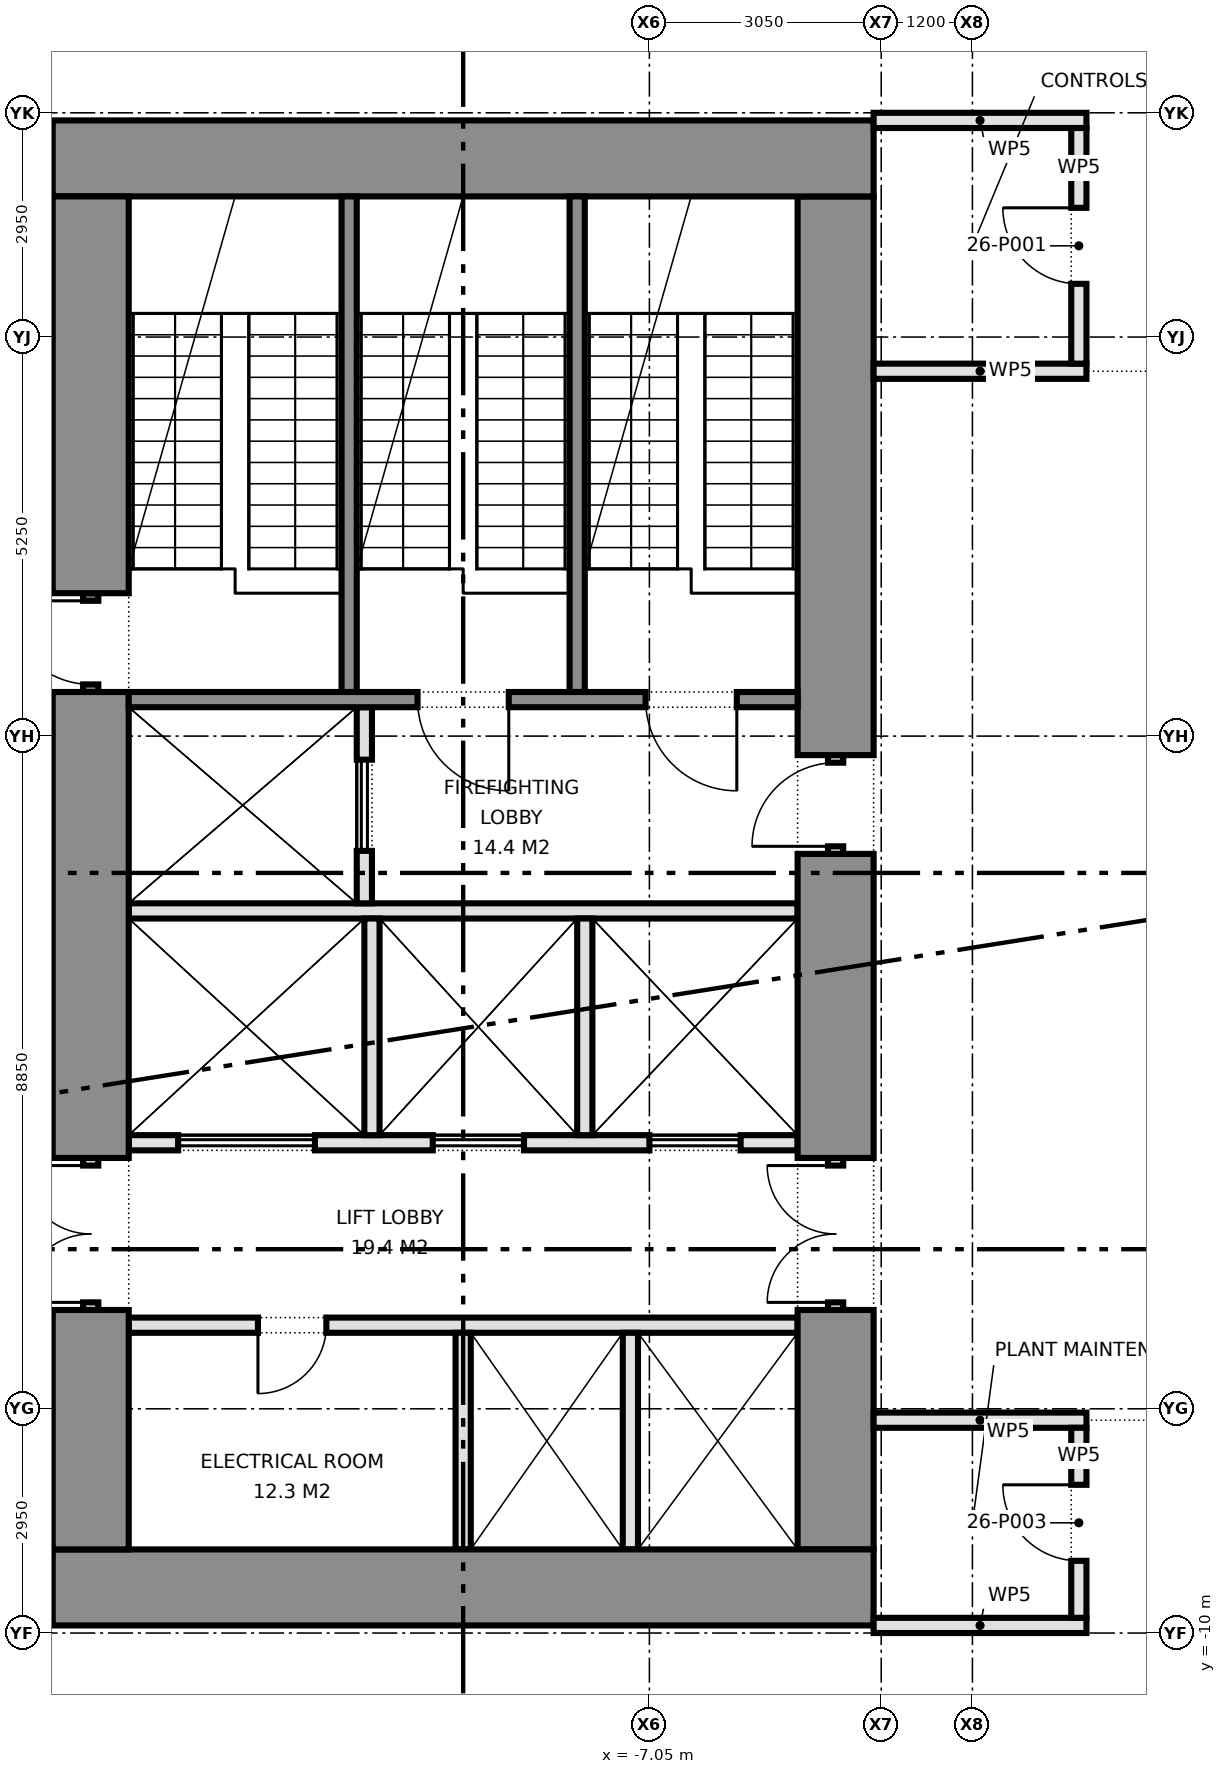
"""IFC4 building model, lengths in metres.
Left out: names, types, materials, properties, quantities, classifications, styles, units other than length and angle.
Written with IfcOpenShell. Run it as: python <this file> out.ifc"""

import sys

from ifc_helpers import new_model, si_unit, direction, frame, frame_2d, origin, place, context, subcontext, project, spatial, rectangle, extrude, element, fill, save


model = new_model("IFC4")
c1 = context("Model", 3, precision=1e-05, world=origin(), true_north=direction((0.0, 1.0)))
c2 = subcontext(c1, "Body", "Model", "MODEL_VIEW")
j1 = project(units=[si_unit("LENGTHUNIT", "METRE"), si_unit("PLANEANGLEUNIT", "RADIAN")], contexts=[c1])
p1 = place(None, origin())
s1 = spatial("IfcSite", under=j1, at=p1, CompositionType="ELEMENT")
p2 = place(p1, origin())
s2 = spatial("IfcBuilding", under=s1, at=p2, CompositionType="ELEMENT")
p3 = place(p2, frame((0.0, 0.0, 120.4)))
s3 = spatial("IfcBuildingStorey", under=s2, at=p3, CompositionType="ELEMENT", Elevation=120.4)
for number, where, z_axis, x_axis in (
    (1, (-14.9, -9.4, 0.0), (0.0, 0.0, 1.0), (1.0, 0.0, 0.0)),
    (2, (-14.9, 9.4, 0.0), (0.0, 0.0, 1.0), (1.0, 0.0, 0.0)),
):
    element("IfcWall", number, at=place(p3, frame(where, z_axis=z_axis, x_axis=x_axis)), inside=s3, PredefinedType="SHEAR", context=c2, shape_type="SweptSolid", body=[
        extrude(rectangle(XDim=10.8, YDim=1.0, at=frame_2d((5.4, 0.0))), origin(), (0.0, 0.0, 1.0), 4.34),
    ])
p4 = place(p3, frame((-14.4, -8.9, 0.0), z_axis=(0.0, 0.0, 1.0), x_axis=(0.0, 1.0, 0.0)))
e3 = element("IfcWall", 3, at=p4, inside=s3, PredefinedType="SHEAR", context=c2, shape_type="SweptSolid", body=[
    extrude(rectangle(XDim=3.15, YDim=1.0, at=frame_2d((1.575, 0.0))), origin(), (0.0, 0.0, 1.0), 4.34),
])
p5 = place(p3, frame((-14.4, -5.75, 0.0), z_axis=(0.0, 0.0, 1.0), x_axis=(0.0, 1.0, 0.0)))
e4 = element("IfcWall", 4, at=p5, inside=s3, PredefinedType="PARTITIONING", context=c2, shape_type="SweptSolid", body=[
    extrude(rectangle(XDim=2.0, YDim=0.2, at=frame_2d((1.0, 0.0))), origin(), (0.0, 0.0, 1.0), 2.4),
])
p6 = place(p5, frame((0.1, 0.0, 0.0)))
e5 = element("IfcOpeningElement", 5, at=p6, cuts=e4, PredefinedType="OPENING", context=c2, shape_type="SweptSolid", body=[
    extrude(rectangle(XDim=1.8, YDim=2.1, at=frame_2d((0.9, 1.05))), frame((0.0, 0.11, 0.0), z_axis=(0.0, -1.0, 0.0), x_axis=(1.0, 0.0, 0.0)), (0.0, 0.0, 1.0), 0.22),
])
p7 = place(p3, frame((-14.4, -3.75, 0.0), z_axis=(0.0, 0.0, 1.0), x_axis=(0.0, 1.0, 0.0)))
e6 = element("IfcWall", 6, at=p7, inside=s3, PredefinedType="SHEAR", context=c2, shape_type="SweptSolid", body=[
    extrude(rectangle(XDim=6.13, YDim=1.0, at=frame_2d((3.065, 0.0))), origin(), (0.0, 0.0, 1.0), 4.34),
])
p8 = place(p3, frame((-14.4, 2.38, 0.0), z_axis=(0.0, 0.0, 1.0), x_axis=(0.0, 1.0, 0.0)))
e7 = element("IfcWall", 7, at=p8, inside=s3, PredefinedType="SHEAR", context=c2, shape_type="SweptSolid", body=[
    extrude(rectangle(XDim=1.3, YDim=0.2, at=frame_2d((0.65, 0.0))), origin(), (0.0, 0.0, 1.0), 2.4),
])
p9 = place(p8, frame((0.1, 0.0, 0.0)))
e8 = element("IfcOpeningElement", 8, at=p9, cuts=e7, PredefinedType="OPENING", context=c2, shape_type="SweptSolid", body=[
    extrude(rectangle(XDim=1.1, YDim=2.1, at=frame_2d((0.55, 1.05))), frame((0.0, 0.11, 0.0), z_axis=(0.0, -1.0, 0.0), x_axis=(1.0, 0.0, 0.0)), (0.0, 0.0, 1.0), 0.22),
])
p10 = place(p3, frame((-14.4, 3.68, 0.0), z_axis=(0.0, 0.0, 1.0), x_axis=(0.0, 1.0, 0.0)))
e9 = element("IfcWall", 9, at=p10, inside=s3, PredefinedType="SHEAR", context=c2, shape_type="SweptSolid", body=[
    extrude(rectangle(XDim=5.22, YDim=1.0, at=frame_2d((2.61, 0.0))), origin(), (0.0, 0.0, 1.0), 4.34),
])
p11 = place(p3, frame((-4.6, -8.9, 0.0), z_axis=(0.0, 0.0, 1.0), x_axis=(0.0, 1.0, 0.0)))
e10 = element("IfcWall", 10, at=p11, inside=s3, PredefinedType="SHEAR", context=c2, shape_type="SweptSolid", body=[
    extrude(rectangle(XDim=3.15, YDim=1.0, at=frame_2d((1.575, 0.0))), origin(), (0.0, 0.0, 1.0), 4.34),
])
p12 = place(p3, frame((-4.6, -5.75, 0.0), z_axis=(0.0, 0.0, 1.0), x_axis=(0.0, 1.0, 0.0)))
e11 = element("IfcWall", 11, at=p12, inside=s3, PredefinedType="PARTITIONING", context=c2, shape_type="SweptSolid", body=[
    extrude(rectangle(XDim=2.0, YDim=0.2, at=frame_2d((1.0, 0.0))), origin(), (0.0, 0.0, 1.0), 2.4),
])
p13 = place(p12, frame((0.1, 0.0, 0.0)))
e12 = element("IfcOpeningElement", 12, at=p13, cuts=e11, PredefinedType="OPENING", context=c2, shape_type="SweptSolid", body=[
    extrude(rectangle(XDim=1.8, YDim=2.1, at=frame_2d((0.9, 1.05))), frame((0.0, 0.11, 0.0), z_axis=(0.0, -1.0, 0.0), x_axis=(1.0, 0.0, 0.0)), (0.0, 0.0, 1.0), 0.22),
])
p14 = place(p3, frame((-4.6, -3.75, 0.0), z_axis=(0.0, 0.0, 1.0), x_axis=(0.0, 1.0, 0.0)))
e13 = element("IfcWall", 13, at=p14, inside=s3, PredefinedType="SHEAR", context=c2, shape_type="SweptSolid", body=[
    extrude(rectangle(XDim=4.0, YDim=1.0, at=frame_2d((2.0, 0.0))), origin(), (0.0, 0.0, 1.0), 4.34),
])
p15 = place(p3, frame((-4.6, 0.25, 0.0), z_axis=(0.0, 0.0, 1.0), x_axis=(0.0, 1.0, 0.0)))
e14 = element("IfcWall", 14, at=p15, inside=s3, PredefinedType="PARTITIONING", context=c2, shape_type="SweptSolid", body=[
    extrude(rectangle(XDim=1.3, YDim=0.2, at=frame_2d((0.65, 0.0))), origin(), (0.0, 0.0, 1.0), 2.4),
])
p16 = place(p15, frame((0.1, 0.0, 0.0)))
e15 = element("IfcOpeningElement", 15, at=p16, cuts=e14, PredefinedType="OPENING", context=c2, shape_type="SweptSolid", body=[
    extrude(rectangle(XDim=1.1, YDim=2.1, at=frame_2d((0.55, 1.05))), frame((0.0, 0.11, 0.0), z_axis=(0.0, -1.0, 0.0), x_axis=(1.0, 0.0, 0.0)), (0.0, 0.0, 1.0), 0.22),
])
p17 = place(p3, frame((-4.6, 1.55, 0.0), z_axis=(0.0, 0.0, 1.0), x_axis=(0.0, 1.0, 0.0)))
e16 = element("IfcWall", 16, at=p17, inside=s3, PredefinedType="SHEAR", context=c2, shape_type="SweptSolid", body=[
    extrude(rectangle(XDim=7.35, YDim=1.0, at=frame_2d((3.675, 0.0))), origin(), (0.0, 0.0, 1.0), 4.34),
])
p18 = place(p3, frame((-13.9, -5.95, 0.0), z_axis=(0.0, 0.0, 1.0), x_axis=(1.0, 0.0, 0.0)))
e17 = element("IfcWall", 17, at=p18, inside=s3, PredefinedType="PARTITIONING", context=c2, shape_type="SweptSolid", body=[
    extrude(rectangle(XDim=8.8, YDim=0.2, at=frame_2d((4.4, 0.0))), origin(), (0.0, 0.0, 1.0), 4.34),
])
p19 = place(p18, frame((1.7, 0.0, 0.0)))
e18 = element("IfcOpeningElement", 18, at=p19, cuts=e17, PredefinedType="OPENING", context=c2, shape_type="SweptSolid", body=[
    extrude(rectangle(XDim=0.9, YDim=2.1, at=frame_2d((0.45, 1.05))), frame((0.0, 0.11, 0.0), z_axis=(0.0, -1.0, 0.0), x_axis=(1.0, 0.0, 0.0)), (0.0, 0.0, 1.0), 0.22),
])
p20 = place(p3, frame((-13.9, -3.55, 0.0), z_axis=(0.0, 0.0, 1.0), x_axis=(1.0, 0.0, 0.0)))
e19 = element("IfcWall", 19, at=p20, inside=s3, PredefinedType="PARTITIONING", context=c2, shape_type="SweptSolid", body=[
    extrude(rectangle(XDim=8.8, YDim=0.2, at=frame_2d((4.4, 0.0))), origin(), (0.0, 0.0, 1.0), 4.34),
])
p21 = place(p20, frame((0.65, 0.0, 0.0)))
e20 = element("IfcOpeningElement", 20, at=p21, cuts=e19, PredefinedType="OPENING", context=c2, shape_type="SweptSolid", body=[
    extrude(rectangle(XDim=1.8, YDim=2.1, at=frame_2d((0.9, 1.05))), frame((0.0, 0.11, 0.0), z_axis=(0.0, -1.0, 0.0), x_axis=(1.0, 0.0, 0.0)), (0.0, 0.0, 1.0), 0.22),
])
p22 = place(p20, frame((4.0, 0.0, 0.0)))
e21 = element("IfcOpeningElement", 21, at=p22, cuts=e19, PredefinedType="OPENING", context=c2, shape_type="SweptSolid", body=[
    extrude(rectangle(XDim=1.2, YDim=2.1, at=frame_2d((0.6, 1.05))), frame((0.0, 0.11, 0.0), z_axis=(0.0, -1.0, 0.0), x_axis=(1.0, 0.0, 0.0)), (0.0, 0.0, 1.0), 0.22),
])
p23 = place(p20, frame((6.85, 0.0, 0.0)))
e22 = element("IfcOpeningElement", 22, at=p23, cuts=e19, PredefinedType="OPENING", context=c2, shape_type="SweptSolid", body=[
    extrude(rectangle(XDim=1.2, YDim=2.1, at=frame_2d((0.6, 1.05))), frame((0.0, 0.11, 0.0), z_axis=(0.0, -1.0, 0.0), x_axis=(1.0, 0.0, 0.0)), (0.0, 0.0, 1.0), 0.22),
])
p24 = place(p3, frame((-13.9, -0.5, 0.0), z_axis=(0.0, 0.0, 1.0), x_axis=(1.0, 0.0, 0.0)))
e23 = element("IfcWall", 23, at=p24, inside=s3, PredefinedType="PARTITIONING", context=c2, shape_type="SweptSolid", body=[
    extrude(rectangle(XDim=8.8, YDim=0.2, at=frame_2d((4.4, 0.0))), origin(), (0.0, 0.0, 1.0), 4.34),
])
p25 = place(p3, frame((-10.8, -0.4, 0.0), z_axis=(0.0, 0.0, 1.0), x_axis=(0.0, 1.0, 0.0)))
e24 = element("IfcWall", 24, at=p25, inside=s3, PredefinedType="PARTITIONING", context=c2, shape_type="SweptSolid", body=[
    extrude(rectangle(XDim=2.58, YDim=0.2, at=frame_2d((1.29, 0.0))), origin(), (0.0, 0.0, 1.0), 4.34),
])
p26 = place(p25, frame((0.69, 0.0, 0.0)))
e25 = element("IfcOpeningElement", 25, at=p26, cuts=e24, PredefinedType="OPENING", context=c2, shape_type="SweptSolid", body=[
    extrude(rectangle(XDim=1.2, YDim=2.1, at=frame_2d((0.6, 1.05))), frame((0.0, 0.11, 0.0), z_axis=(0.0, -1.0, 0.0), x_axis=(1.0, 0.0, 0.0)), (0.0, 0.0, 1.0), 0.22),
])
p27 = place(p3, frame((-13.9, 2.28, 0.0), z_axis=(0.0, 0.0, 1.0), x_axis=(1.0, 0.0, 0.0)))
e26 = element("IfcWall", 26, at=p27, inside=s3, PredefinedType="SHEAR", context=c2, shape_type="SweptSolid", body=[
    extrude(rectangle(XDim=8.8, YDim=0.2, at=frame_2d((4.4, 0.0))), origin(), (0.0, 0.0, 1.0), 4.34),
])
p28 = place(p27, frame((3.8, 0.0, 0.0)))
e27 = element("IfcOpeningElement", 27, at=p28, cuts=e26, PredefinedType="OPENING", context=c2, shape_type="SweptSolid", body=[
    extrude(rectangle(XDim=1.2, YDim=2.1, at=frame_2d((0.6, 1.05))), frame((0.0, 0.11, 0.0), z_axis=(0.0, -1.0, 0.0), x_axis=(1.0, 0.0, 0.0)), (0.0, 0.0, 1.0), 0.22),
])
p29 = place(p27, frame((6.8, 0.0, 0.0)))
e28 = element("IfcOpeningElement", 28, at=p29, cuts=e26, PredefinedType="OPENING", context=c2, shape_type="SweptSolid", body=[
    extrude(rectangle(XDim=1.2, YDim=2.1, at=frame_2d((0.6, 1.05))), frame((0.0, 0.11, 0.0), z_axis=(0.0, -1.0, 0.0), x_axis=(1.0, 0.0, 0.0)), (0.0, 0.0, 1.0), 0.22),
])
for number, where, z_axis, x_axis in (
    (29, (-11.0, 2.38, 0.0), (0.0, 0.0, 1.0), (0.0, 1.0, 0.0)),
    (30, (-8.0, 2.38, 0.0), (0.0, 0.0, 1.0), (0.0, 1.0, 0.0)),
):
    element("IfcWall", number, at=place(p3, frame(where, z_axis=z_axis, x_axis=x_axis)), inside=s3, PredefinedType="SHEAR", context=c2, shape_type="SweptSolid", body=[
        extrude(rectangle(XDim=6.52, YDim=0.2, at=frame_2d((3.26, 0.0))), origin(), (0.0, 0.0, 1.0), 4.34),
    ])
for number, where, z_axis, x_axis in (
    (31, (-9.5, -8.9, 0.0), (0.0, 0.0, 1.0), (0.0, 1.0, 0.0)),
    (32, (-7.3, -8.9, 0.0), (0.0, 0.0, 1.0), (0.0, 1.0, 0.0)),
    (33, (-10.7, -3.45, 0.0), (0.0, 0.0, 1.0), (0.0, 1.0, 0.0)),
    (34, (-7.9, -3.45, 0.0), (0.0, 0.0, 1.0), (0.0, 1.0, 0.0)),
):
    element("IfcWall", number, at=place(p3, frame(where, z_axis=z_axis, x_axis=x_axis)), inside=s3, PredefinedType="PARTITIONING", context=c2, shape_type="SweptSolid", body=[
        extrude(rectangle(XDim=2.85, YDim=0.2, at=frame_2d((1.425, 0.0))), origin(), (0.0, 0.0, 1.0), 4.34),
    ])
for number, where, z_axis, x_axis in (
    (35, (-4.1, -9.9, 0.0), (0.0, 0.0, 1.0), (1.0, 0.0, 0.0)),
    (36, (-4.1, -7.2, 0.0), (0.0, 0.0, 1.0), (1.0, 0.0, 0.0)),
    (37, (-4.1, 6.6, 0.0), (0.0, 0.0, 1.0), (1.0, 0.0, 0.0)),
    (38, (-4.1, 9.9, 0.0), (0.0, 0.0, 1.0), (1.0, 0.0, 0.0)),
):
    element("IfcWall", number, at=place(p3, frame(where, z_axis=z_axis, x_axis=x_axis)), inside=s3, PredefinedType="PARTITIONING", context=c2, shape_type="SweptSolid", body=[
        extrude(rectangle(XDim=2.8, YDim=0.2, at=frame_2d((1.4, 0.0))), origin(), (0.0, 0.0, 1.0), 4.34),
    ])
p30 = place(p3, frame((-1.4, -9.8, 0.0), z_axis=(0.0, 0.0, 1.0), x_axis=(0.0, 1.0, 0.0)))
e39 = element("IfcWall", 39, at=p30, inside=s3, PredefinedType="PARTITIONING", context=c2, shape_type="SweptSolid", body=[
    extrude(rectangle(XDim=2.5, YDim=0.2, at=frame_2d((1.25, 0.0))), origin(), (0.0, 0.0, 1.0), 4.34),
])
p31 = place(p30, frame((0.75, 0.0, 0.0)))
e40 = element("IfcOpeningElement", 40, at=p31, cuts=e39, PredefinedType="OPENING", context=c2, shape_type="SweptSolid", body=[
    extrude(rectangle(XDim=1.0, YDim=2.1, at=frame_2d((0.5, 1.05))), frame((0.0, 0.11, 0.0), z_axis=(0.0, -1.0, 0.0), x_axis=(1.0, 0.0, 0.0)), (0.0, 0.0, 1.0), 0.22),
])
p32 = place(p3, frame((-1.4, 6.7, 0.0), z_axis=(0.0, 0.0, 1.0), x_axis=(0.0, 1.0, 0.0)))
e41 = element("IfcWall", 41, at=p32, inside=s3, PredefinedType="PARTITIONING", context=c2, shape_type="SweptSolid", body=[
    extrude(rectangle(XDim=3.1, YDim=0.2, at=frame_2d((1.55, 0.0))), origin(), (0.0, 0.0, 1.0), 4.34),
])
p33 = place(p32, frame((1.05, 0.0, 0.0)))
e42 = element("IfcOpeningElement", 42, at=p33, cuts=e41, PredefinedType="OPENING", context=c2, shape_type="SweptSolid", body=[
    extrude(rectangle(XDim=1.0, YDim=2.1, at=frame_2d((0.5, 1.05))), frame((0.0, 0.11, 0.0), z_axis=(0.0, -1.0, 0.0), x_axis=(1.0, 0.0, 0.0)), (0.0, 0.0, 1.0), 0.22),
])
p34 = place(p6, origin())
e43 = element("IfcDoor", 43, at=p34, inside=s3, OperationType="DOUBLE_DOOR_SINGLE_SWING", PredefinedType="DOOR", context=c2, shape_type="SweptSolid", body=[
    extrude(rectangle(XDim=1.8, YDim=2.1, at=frame_2d((0.9, 1.05))), frame((0.0, 0.025, 0.0), z_axis=(0.0, -1.0, 0.0), x_axis=(1.0, 0.0, 0.0)), (0.0, 0.0, 1.0), 0.05),
])
fill(e5, e43)
p35 = place(p9, origin())
e44 = element("IfcDoor", 44, at=p35, inside=s3, OperationType="SINGLE_SWING_RIGHT", PredefinedType="DOOR", context=c2, shape_type="SweptSolid", body=[
    extrude(rectangle(XDim=1.1, YDim=2.1, at=frame_2d((0.55, 1.05))), frame((0.0, 0.025, 0.0), z_axis=(0.0, -1.0, 0.0), x_axis=(1.0, 0.0, 0.0)), (0.0, 0.0, 1.0), 0.05),
])
fill(e8, e44)
p36 = place(p13, origin())
e45 = element("IfcDoor", 45, at=p36, inside=s3, OperationType="DOUBLE_DOOR_SINGLE_SWING", PredefinedType="DOOR", context=c2, shape_type="SweptSolid", body=[
    extrude(rectangle(XDim=1.8, YDim=2.1, at=frame_2d((0.9, 1.05))), frame((0.0, 0.025, 0.0), z_axis=(0.0, -1.0, 0.0), x_axis=(1.0, 0.0, 0.0)), (0.0, 0.0, 1.0), 0.05),
])
fill(e12, e45)
p37 = place(p16, origin())
e46 = element("IfcDoor", 46, at=p37, inside=s3, OperationType="SINGLE_SWING_LEFT", PredefinedType="DOOR", context=c2, shape_type="SweptSolid", body=[
    extrude(rectangle(XDim=1.1, YDim=2.1, at=frame_2d((0.55, 1.05))), frame((0.0, 0.025, 0.0), z_axis=(0.0, -1.0, 0.0), x_axis=(1.0, 0.0, 0.0)), (0.0, 0.0, 1.0), 0.05),
])
fill(e15, e46)
p38 = place(p21, origin())
e47 = element("IfcDoor", 47, at=p38, inside=s3, OperationType="DOUBLE_DOOR_SLIDING", PredefinedType="DOOR", context=c2, shape_type="SweptSolid", body=[
    extrude(rectangle(XDim=1.8, YDim=2.1, at=frame_2d((0.9, 1.05))), frame((0.0, 0.025, 0.0), z_axis=(0.0, -1.0, 0.0), x_axis=(1.0, 0.0, 0.0)), (0.0, 0.0, 1.0), 0.05),
])
fill(e20, e47)
p39 = place(p22, origin())
e48 = element("IfcDoor", 48, at=p39, inside=s3, OperationType="DOUBLE_DOOR_SLIDING", PredefinedType="DOOR", context=c2, shape_type="SweptSolid", body=[
    extrude(rectangle(XDim=1.2, YDim=2.1, at=frame_2d((0.6, 1.05))), frame((0.0, 0.025, 0.0), z_axis=(0.0, -1.0, 0.0), x_axis=(1.0, 0.0, 0.0)), (0.0, 0.0, 1.0), 0.05),
])
fill(e21, e48)
p40 = place(p23, origin())
e49 = element("IfcDoor", 49, at=p40, inside=s3, OperationType="DOUBLE_DOOR_SLIDING", PredefinedType="DOOR", context=c2, shape_type="SweptSolid", body=[
    extrude(rectangle(XDim=1.2, YDim=2.1, at=frame_2d((0.6, 1.05))), frame((0.0, 0.025, 0.0), z_axis=(0.0, -1.0, 0.0), x_axis=(1.0, 0.0, 0.0)), (0.0, 0.0, 1.0), 0.05),
])
fill(e22, e49)
p41 = place(p26, origin())
e50 = element("IfcDoor", 50, at=p41, inside=s3, OperationType="DOUBLE_DOOR_SLIDING", PredefinedType="DOOR", context=c2, shape_type="SweptSolid", body=[
    extrude(rectangle(XDim=1.2, YDim=2.1, at=frame_2d((0.6, 1.05))), frame((0.0, 0.025, 0.0), z_axis=(0.0, -1.0, 0.0), x_axis=(1.0, 0.0, 0.0)), (0.0, 0.0, 1.0), 0.05),
])
fill(e25, e50)
p42 = place(p19, frame((0.9, 0.0, 0.0), z_axis=(0.0, 0.0, 1.0), x_axis=(-1.0, 0.0, 0.0)))
e51 = element("IfcDoor", 51, at=p42, inside=s3, OperationType="SINGLE_SWING_RIGHT", PredefinedType="DOOR", context=c2, shape_type="SweptSolid", body=[
    extrude(rectangle(XDim=0.9, YDim=2.1, at=frame_2d((0.45, 1.05))), frame((0.0, 0.025, 0.0), z_axis=(0.0, -1.0, 0.0), x_axis=(1.0, 0.0, 0.0)), (0.0, 0.0, 1.0), 0.05),
])
fill(e18, e51)
p43 = place(p28, frame((1.2, 0.0, 0.0), z_axis=(0.0, 0.0, 1.0), x_axis=(-1.0, 0.0, 0.0)))
e52 = element("IfcDoor", 52, at=p43, inside=s3, OperationType="SINGLE_SWING_LEFT", PredefinedType="DOOR", context=c2, shape_type="SweptSolid", body=[
    extrude(rectangle(XDim=1.2, YDim=2.1, at=frame_2d((0.6, 1.05))), frame((0.0, 0.025, 0.0), z_axis=(0.0, -1.0, 0.0), x_axis=(1.0, 0.0, 0.0)), (0.0, 0.0, 1.0), 0.05),
])
fill(e27, e52)
p44 = place(p29, frame((1.2, 0.0, 0.0), z_axis=(0.0, 0.0, 1.0), x_axis=(-1.0, 0.0, 0.0)))
e53 = element("IfcDoor", 53, at=p44, inside=s3, OperationType="SINGLE_SWING_LEFT", PredefinedType="DOOR", context=c2, shape_type="SweptSolid", body=[
    extrude(rectangle(XDim=1.2, YDim=2.1, at=frame_2d((0.6, 1.05))), frame((0.0, 0.025, 0.0), z_axis=(0.0, -1.0, 0.0), x_axis=(1.0, 0.0, 0.0)), (0.0, 0.0, 1.0), 0.05),
])
fill(e28, e53)
p45 = place(p33, origin())
e54 = element("IfcDoor", 54, at=p45, inside=s3, OperationType="SINGLE_SWING_RIGHT", PredefinedType="DOOR", context=c2, shape_type="SweptSolid", body=[
    extrude(rectangle(XDim=1.0, YDim=2.1, at=frame_2d((0.5, 1.05))), frame((0.0, 0.025, 0.0), z_axis=(0.0, -1.0, 0.0), x_axis=(1.0, 0.0, 0.0)), (0.0, 0.0, 1.0), 0.05),
])
fill(e42, e54)
p46 = place(p31, origin())
e55 = element("IfcDoor", 55, at=p46, inside=s3, OperationType="SINGLE_SWING_RIGHT", PredefinedType="DOOR", context=c2, shape_type="SweptSolid", body=[
    extrude(rectangle(XDim=1.0, YDim=2.1, at=frame_2d((0.5, 1.05))), frame((0.0, 0.025, 0.0), z_axis=(0.0, -1.0, 0.0), x_axis=(1.0, 0.0, 0.0)), (0.0, 0.0, 1.0), 0.05),
])
fill(e40, e55)
save(model, sys.argv[1])
